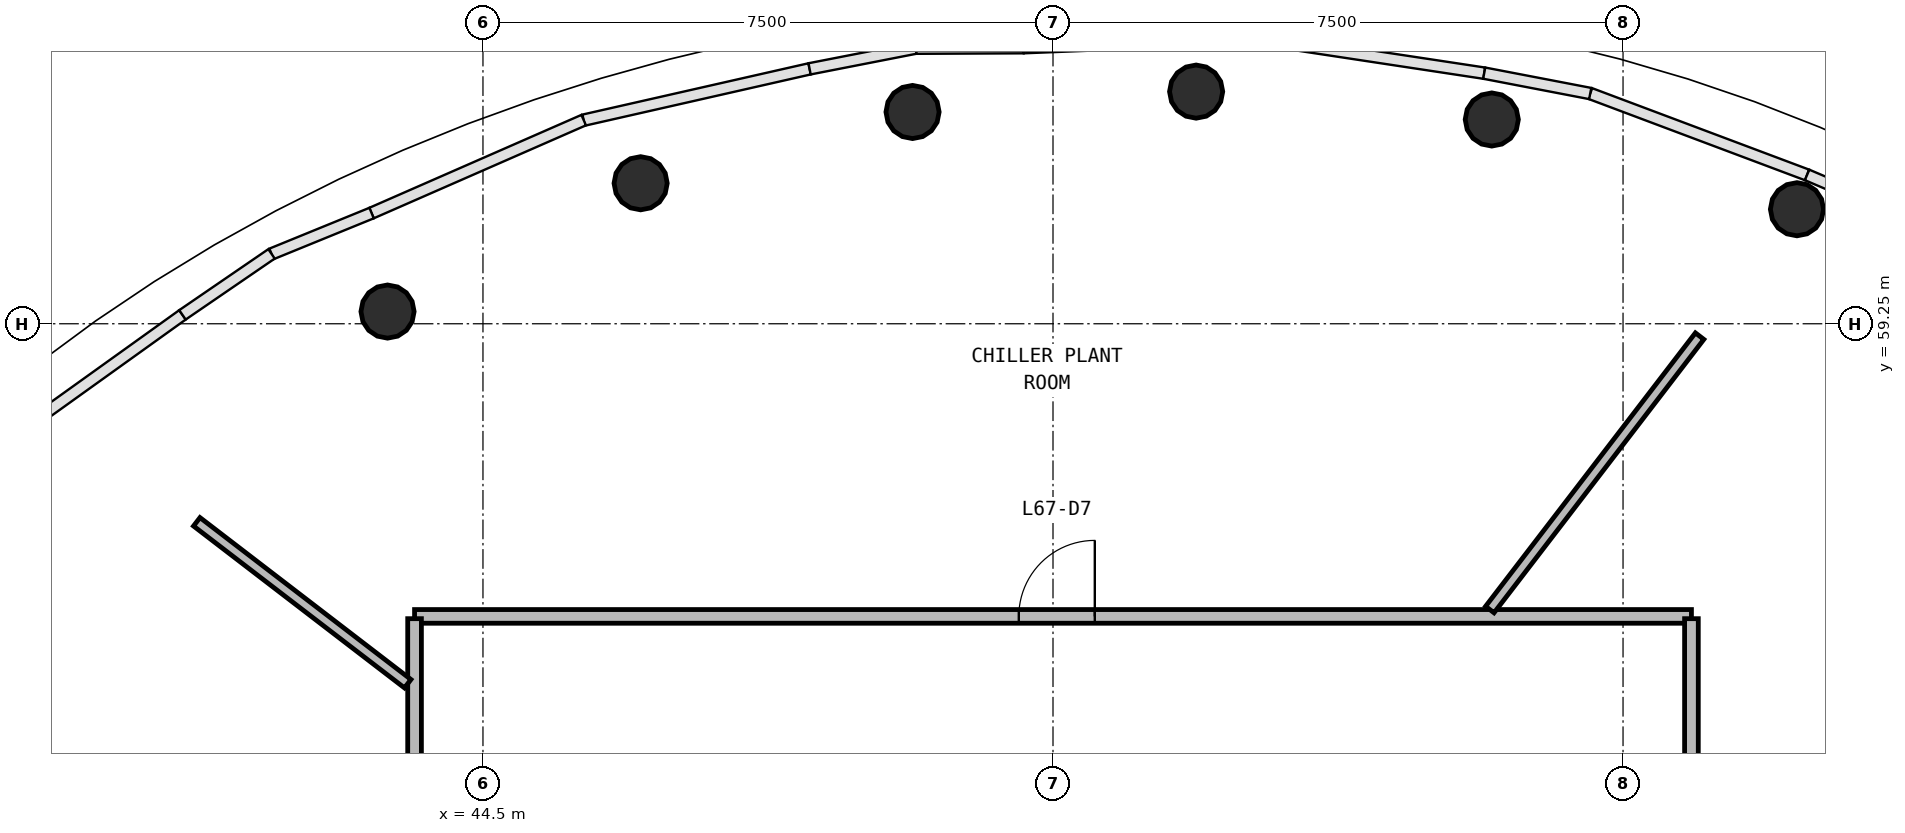
"""IFC4 building model, lengths in metres.
Left out: names, types, materials, properties, quantities, classifications, styles, units other than length and angle.
Written with IfcOpenShell. Run it as: python <this file> out.ifc"""

import sys

from ifc_helpers import new_model, si_unit, direction, frame, frame_2d, origin, origin_2d, place, context, subcontext, project, spatial, rectangle, circle, extrude, source, transform, mapped, element, fill, save


model = new_model("IFC4")
c1 = context("Model", 3, precision=1e-05, world=origin(), true_north=direction((0.0, 1.0)))
c2 = subcontext(c1, "Body", "Model", "MODEL_VIEW")
j1 = project(units=[si_unit("LENGTHUNIT", "METRE"), si_unit("PLANEANGLEUNIT", "RADIAN")], contexts=[c1])
p1 = place(None, origin())
s1 = spatial("IfcSite", under=j1, at=p1, CompositionType="ELEMENT")
p2 = place(p1, origin())
s2 = spatial("IfcBuilding", under=s1, at=p2, CompositionType="ELEMENT")
p3 = place(p2, frame((0.0, 0.0, 273.1)))
s3 = spatial("IfcBuildingStorey", under=s2, at=p3, CompositionType="ELEMENT", Elevation=273.1)
m1 = source(origin(), c2, "Body", "SweptSolid", [
    extrude(circle(Radius=0.35, at=origin_2d()), origin(), (0.0, 0.0, 1.0), 3.908),
])
p4 = place(p3, frame((61.789, 60.757, 0.159), z_axis=(-0.270818872405, -0.352907914698, 0.895607694302), x_axis=(0.793328254579, -0.608794119951, 0.0)))
e1 = element("IfcColumn", 1, at=p4, inside=s3, PredefinedType="COLUMN", context=c2, shape_type="MappedRepresentation", body=[
    mapped(m1, transform((0.0, 0.0, 0.0), scale=1.0)),
])
m2 = source(origin(), c2, "Body", "SweptSolid", [
    extrude(circle(Radius=0.35, at=origin_2d()), origin(), (0.0, 0.0, 1.0), 3.834),
])
p5 = place(p3, frame((57.773, 61.938, 0.146), z_axis=(-0.156149965991, -0.377001549212, 0.912955102956), x_axis=(0.923887493655, -0.382664211899, 0.0)))
e2 = element("IfcColumn", 2, at=p5, inside=s3, PredefinedType="COLUMN", context=c2, shape_type="MappedRepresentation", body=[
    mapped(m2, transform((0.0, 0.0, 0.0), scale=1.0)),
])
m3 = source(origin(), c2, "Body", "SweptSolid", [
    extrude(circle(Radius=0.35, at=origin_2d()), origin(), (0.0, 0.0, 1.0), 3.784),
])
p6 = place(p3, frame((53.883, 62.304, 0.136), z_axis=(-0.049674543277, -0.377074942147, 0.924849678464), x_axis=(0.99143407694, -0.130608081992, 0.0)))
e3 = element("IfcColumn", 3, at=p6, inside=s3, PredefinedType="COLUMN", context=c2, shape_type="MappedRepresentation", body=[
    mapped(m3, transform((0.0, 0.0, 0.0), scale=1.0)),
])
m4 = source(origin(), c2, "Body", "SweptSolid", [
    extrude(circle(Radius=0.35, at=origin_2d()), origin(), (0.0, 0.0, 1.0), 3.759),
])
p7 = place(p3, frame((50.152, 62.036, 0.131), z_axis=(0.047668800905, -0.361802302239, 0.931035326674), x_axis=(0.991431868961, 0.130624841468, 0.0)))
e4 = element("IfcColumn", 4, at=p7, inside=s3, PredefinedType="COLUMN", context=c2, shape_type="MappedRepresentation", body=[
    mapped(m4, transform((0.0, 0.0, 0.0), scale=1.0)),
])
m5 = source(origin(), c2, "Body", "SweptSolid", [
    extrude(circle(Radius=0.35, at=origin_2d()), origin(), (0.0, 0.0, 1.0), 3.747),
])
p8 = place(p3, frame((46.574, 61.098, 0.128), z_axis=(0.136577604612, -0.329715018769, 0.934149112464), x_axis=(0.923874408562, 0.38269580244, 0.0)))
e5 = element("IfcColumn", 5, at=p8, inside=s3, PredefinedType="COLUMN", context=c2, shape_type="MappedRepresentation", body=[
    mapped(m5, transform((0.0, 0.0, 0.0), scale=1.0)),
])
m6 = source(origin(), c2, "Body", "SweptSolid", [
    extrude(circle(Radius=0.35, at=origin_2d()), origin(), (0.0, 0.0, 1.0), 3.739),
])
p9 = place(p3, frame((43.244, 59.41, 0.126), z_axis=(0.213999096527, -0.278845328706, 0.936188906869), x_axis=(0.79330723931, 0.608821504267, 0.0)))
e6 = element("IfcColumn", 6, at=p9, inside=s3, PredefinedType="COLUMN", context=c2, shape_type="MappedRepresentation", body=[
    mapped(m6, transform((0.0, 0.0, 0.0), scale=1.0)),
])
m7 = source(origin(), c2, "Body", "SweptSolid", [
    extrude(circle(Radius=0.35, at=origin_2d()), origin(), (0.0, 0.0, 1.0), 3.807),
])
p10 = place(p3, frame((37.333, 54.075, 0.141), z_axis=(0.363645996148, -0.150626775693, 0.919278610613), x_axis=(0.382682721486, 0.923879826967, 0.0)))
e7 = element("IfcColumn", 7, at=p10, inside=s3, PredefinedType="COLUMN", context=c2, shape_type="MappedRepresentation", body=[
    mapped(m7, transform((0.0, 0.0, 0.0), scale=1.0)),
])
p11 = place(p3, frame((43.6, 55.4, 0.0), z_axis=(0.0, 0.0, 1.0), x_axis=(1.0, 0.0, 0.0)))
e8 = element("IfcWall", 8, at=p11, inside=s3, PredefinedType="PARTITIONING", context=c2, shape_type="SweptSolid", body=[
    extrude(rectangle(XDim=16.8, YDim=0.18, at=frame_2d((8.4, 0.0))), origin(), (0.0, 0.0, 1.0), 2.62),
])
p12 = place(p11, frame((7.95, 0.0, 0.0)))
e9 = element("IfcOpeningElement", 9, at=p12, cuts=e8, PredefinedType="OPENING", context=c2, shape_type="SweptSolid", body=[
    extrude(rectangle(XDim=1.0, YDim=2.1, at=frame_2d((0.5, 1.05))), frame((0.0, 0.1, 0.0), z_axis=(0.0, -1.0, 0.0), x_axis=(1.0, 0.0, 0.0)), (0.0, 0.0, 1.0), 0.2),
])
p13 = place(p3, frame((60.4, 55.37, 0.0), z_axis=(0.0, 0.0, 1.0), x_axis=(0.0, -1.0, 0.0)))
e10 = element("IfcWall", 10, at=p13, inside=s3, PredefinedType="PARTITIONING", context=c2, shape_type="SweptSolid", body=[
    extrude(rectangle(XDim=14.74, YDim=0.18, at=frame_2d((7.37, 0.0))), origin(), (0.0, 0.0, 1.0), 2.613),
])
p14 = place(p13, frame((6.89, 0.0, 0.0)))
e11 = element("IfcOpeningElement", 11, at=p14, cuts=e10, PredefinedType="OPENING", context=c2, shape_type="SweptSolid", body=[
    extrude(rectangle(XDim=1.0, YDim=2.1, at=frame_2d((0.5, 1.05))), frame((0.0, 0.1, 0.0), z_axis=(0.0, -1.0, 0.0), x_axis=(1.0, 0.0, 0.0)), (0.0, 0.0, 1.0), 0.2),
])
p15 = place(p3, frame((43.6, 40.63, 0.0), z_axis=(0.0, 0.0, 1.0), x_axis=(0.0, 1.0, 0.0)))
e12 = element("IfcWall", 12, at=p15, inside=s3, PredefinedType="PARTITIONING", context=c2, shape_type="SweptSolid", body=[
    extrude(rectangle(XDim=14.74, YDim=0.18, at=frame_2d((7.37, 0.0))), origin(), (0.0, 0.0, 1.0), 2.613),
])
p16 = place(p15, frame((6.89, 0.0, 0.0)))
e13 = element("IfcOpeningElement", 13, at=p16, cuts=e12, PredefinedType="OPENING", context=c2, shape_type="SweptSolid", body=[
    extrude(rectangle(XDim=1.0, YDim=2.1, at=frame_2d((0.5, 1.05))), frame((0.0, 0.1, 0.0), z_axis=(0.0, -1.0, 0.0), x_axis=(1.0, 0.0, 0.0)), (0.0, 0.0, 1.0), 0.2),
])
p17 = place(p3, frame((43.51, 54.515, 0.0), z_axis=(0.0, 0.0, 1.0), x_axis=(-0.793378297772, 0.608728902407, 0.0)))
e14 = element("IfcWall", 14, at=p17, inside=s3, PredefinedType="PARTITIONING", context=c2, shape_type="SweptSolid", body=[
    extrude(rectangle(XDim=3.499, YDim=0.14, at=frame_2d((1.749, 0.0))), origin(), (0.0, 0.0, 1.0), 2.62),
])
p18 = place(p3, frame((57.747, 55.49, 0.0), z_axis=(0.0, 0.0, 1.0), x_axis=(0.608742343677, 0.793367984617, 0.0)))
e15 = element("IfcWall", 15, at=p18, inside=s3, PredefinedType="PARTITIONING", context=c2, shape_type="SweptSolid", body=[
    extrude(rectangle(XDim=4.534, YDim=0.14, at=frame_2d((2.267, 0.0))), origin(), (0.0, 0.0, 1.0), 2.62),
])
m8 = source(origin(), c2, "Body", "SweptSolid", [
    extrude(rectangle(XDim=1.0, YDim=2.1, at=frame_2d((0.5, 1.05))), frame((0.0, 0.025, 0.0), z_axis=(0.0, -1.0, 0.0), x_axis=(1.0, 0.0, 0.0)), (0.0, 0.0, 1.0), 0.05),
])
p19 = place(p12, origin())
e16 = element("IfcDoor", 16, at=p19, inside=s3, OperationType="SINGLE_SWING_RIGHT", PredefinedType="DOOR", context=c2, shape_type="MappedRepresentation", body=[
    mapped(m8, transform((0.0, 0.0, 0.0), scale=1.0)),
])
fill(e9, e16)
save(model, sys.argv[1])
